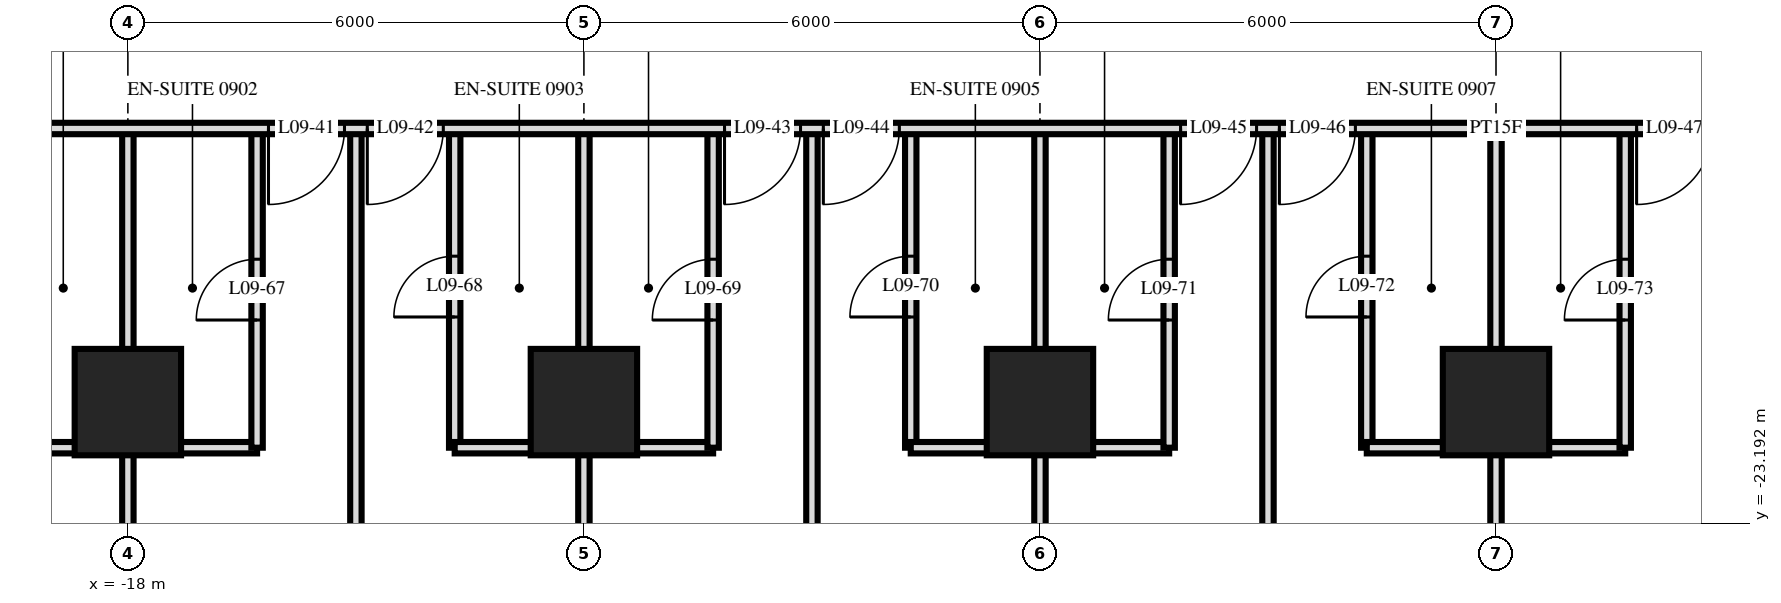
"""IFC4 building model, lengths in metres.
Left out: names, types, materials, properties, quantities, classifications, styles, units other than length and angle.
Written with IfcOpenShell. Run it as: python <this file> out.ifc"""

import sys

from ifc_helpers import new_model, si_unit, direction, frame, frame_2d, origin, origin_2d, place, context, subcontext, project, spatial, rectangle, extrude, element, fill, save


model = new_model("IFC4")
c1 = context("Model", 3, precision=1e-05, world=origin(), true_north=direction((0.0, 1.0)))
c2 = subcontext(c1, "Body", "Model", "MODEL_VIEW")
j1 = project(units=[si_unit("LENGTHUNIT", "METRE"), si_unit("PLANEANGLEUNIT", "RADIAN")], contexts=[c1])
p1 = place(None, origin())
s1 = spatial("IfcSite", under=j1, at=p1, CompositionType="ELEMENT")
p2 = place(p1, origin())
s2 = spatial("IfcBuilding", under=s1, at=p2, CompositionType="ELEMENT")
p3 = place(p2, frame((0.0, 0.0, 42.0)))
s3 = spatial("IfcBuildingStorey", under=s2, at=p3, CompositionType="ELEMENT", Elevation=42.0)
for number, where, z_axis, x_axis in (
    (1, (-18.0, -21.6, 0.0), (0.0, 0.0, 1.0), (1.0, 0.0, 0.0)),
    (2, (-12.0, -21.6, 0.0), (0.0, 0.0, 1.0), (1.0, 0.0, 0.0)),
    (3, (-6.0, -21.6, 0.0), (0.0, 0.0, 1.0), (1.0, 0.0, 0.0)),
    (4, (0.0, -21.6, 0.0), (0.0, 0.0, 1.0), (1.0, 0.0, 0.0)),
):
    element("IfcColumn", number, at=place(p3, frame(where, z_axis=z_axis, x_axis=x_axis)), inside=s3, PredefinedType="COLUMN", context=c2, shape_type="SweptSolid", body=[
        extrude(rectangle(XDim=1.4, YDim=1.4, at=origin_2d()), origin(), (0.0, 0.0, 1.0), 3.6),
    ])
p4 = place(p3, frame((1.7, -22.2, 0.0), z_axis=(0.0, 0.0, 1.0), x_axis=(0.0, 1.0, 0.0)))
e5 = element("IfcWall", 5, at=p4, inside=s3, PredefinedType="PARTITIONING", context=c2, shape_type="SweptSolid", body=[
    extrude(rectangle(XDim=4.2, YDim=0.15, at=frame_2d((2.1, 0.0))), origin(), (0.0, 0.0, 1.0), 3.32),
])
p5 = place(p4, frame((1.68, 0.0, 0.0)))
e6 = element("IfcOpeningElement", 6, at=p5, cuts=e5, PredefinedType="OPENING", context=c2, shape_type="SweptSolid", body=[
    extrude(rectangle(XDim=0.8, YDim=2.1, at=frame_2d((0.4, 1.05))), frame((0.0, 0.085, 0.0), z_axis=(0.0, -1.0, 0.0), x_axis=(1.0, 0.0, 0.0)), (0.0, 0.0, 1.0), 0.17),
])
p6 = place(p3, frame((0.0, -29.22, 0.0), z_axis=(0.0, 0.0, 1.0), x_axis=(0.0, 1.0, 0.0)))
e7 = element("IfcWall", 7, at=p6, inside=s3, PredefinedType="PARTITIONING", context=c2, shape_type="SweptSolid", body=[
    extrude(rectangle(XDim=11.22, YDim=0.15, at=frame_2d((5.61, 0.0))), origin(), (0.0, 0.0, 1.0), 3.32),
])
p7 = place(p3, frame((-1.7, -22.2, 0.0), z_axis=(0.0, 0.0, 1.0), x_axis=(0.0, 1.0, 0.0)))
e8 = element("IfcWall", 8, at=p7, inside=s3, PredefinedType="PARTITIONING", context=c2, shape_type="SweptSolid", body=[
    extrude(rectangle(XDim=4.2, YDim=0.15, at=frame_2d((2.1, 0.0))), origin(), (0.0, 0.0, 1.0), 3.32),
])
p8 = place(p7, frame((1.72, 0.0, 0.0)))
e9 = element("IfcOpeningElement", 9, at=p8, cuts=e8, PredefinedType="OPENING", context=c2, shape_type="SweptSolid", body=[
    extrude(rectangle(XDim=0.8, YDim=2.1, at=frame_2d((0.4, 1.05))), frame((0.0, 0.085, 0.0), z_axis=(0.0, -1.0, 0.0), x_axis=(1.0, 0.0, 0.0)), (0.0, 0.0, 1.0), 0.17),
])
p9 = place(p3, frame((-3.0, -29.22, 0.0), z_axis=(0.0, 0.0, 1.0), x_axis=(0.0, 1.0, 0.0)))
e10 = element("IfcWall", 10, at=p9, inside=s3, PredefinedType="PARTITIONING", context=c2, shape_type="SweptSolid", body=[
    extrude(rectangle(XDim=11.22, YDim=0.15, at=frame_2d((5.61, 0.0))), origin(), (0.0, 0.0, 1.0), 3.32),
])
p10 = place(p3, frame((-4.3, -22.2, 0.0), z_axis=(0.0, 0.0, 1.0), x_axis=(0.0, 1.0, 0.0)))
e11 = element("IfcWall", 11, at=p10, inside=s3, PredefinedType="PARTITIONING", context=c2, shape_type="SweptSolid", body=[
    extrude(rectangle(XDim=4.2, YDim=0.15, at=frame_2d((2.1, 0.0))), origin(), (0.0, 0.0, 1.0), 3.32),
])
p11 = place(p10, frame((1.68, 0.0, 0.0)))
e12 = element("IfcOpeningElement", 12, at=p11, cuts=e11, PredefinedType="OPENING", context=c2, shape_type="SweptSolid", body=[
    extrude(rectangle(XDim=0.8, YDim=2.1, at=frame_2d((0.4, 1.05))), frame((0.0, 0.085, 0.0), z_axis=(0.0, -1.0, 0.0), x_axis=(1.0, 0.0, 0.0)), (0.0, 0.0, 1.0), 0.17),
])
p12 = place(p3, frame((-6.0, -29.22, 0.0), z_axis=(0.0, 0.0, 1.0), x_axis=(0.0, 1.0, 0.0)))
e13 = element("IfcWall", 13, at=p12, inside=s3, PredefinedType="PARTITIONING", context=c2, shape_type="SweptSolid", body=[
    extrude(rectangle(XDim=11.22, YDim=0.15, at=frame_2d((5.61, 0.0))), origin(), (0.0, 0.0, 1.0), 3.32),
])
p13 = place(p3, frame((-7.7, -22.2, 0.0), z_axis=(0.0, 0.0, 1.0), x_axis=(0.0, 1.0, 0.0)))
e14 = element("IfcWall", 14, at=p13, inside=s3, PredefinedType="PARTITIONING", context=c2, shape_type="SweptSolid", body=[
    extrude(rectangle(XDim=4.2, YDim=0.15, at=frame_2d((2.1, 0.0))), origin(), (0.0, 0.0, 1.0), 3.32),
])
p14 = place(p13, frame((1.72, 0.0, 0.0)))
e15 = element("IfcOpeningElement", 15, at=p14, cuts=e14, PredefinedType="OPENING", context=c2, shape_type="SweptSolid", body=[
    extrude(rectangle(XDim=0.8, YDim=2.1, at=frame_2d((0.4, 1.05))), frame((0.0, 0.085, 0.0), z_axis=(0.0, -1.0, 0.0), x_axis=(1.0, 0.0, 0.0)), (0.0, 0.0, 1.0), 0.17),
])
p15 = place(p3, frame((-9.0, -29.22, 0.0), z_axis=(0.0, 0.0, 1.0), x_axis=(0.0, 1.0, 0.0)))
e16 = element("IfcWall", 16, at=p15, inside=s3, PredefinedType="PARTITIONING", context=c2, shape_type="SweptSolid", body=[
    extrude(rectangle(XDim=11.22, YDim=0.15, at=frame_2d((5.61, 0.0))), origin(), (0.0, 0.0, 1.0), 3.32),
])
p16 = place(p3, frame((-10.3, -22.2, 0.0), z_axis=(0.0, 0.0, 1.0), x_axis=(0.0, 1.0, 0.0)))
e17 = element("IfcWall", 17, at=p16, inside=s3, PredefinedType="PARTITIONING", context=c2, shape_type="SweptSolid", body=[
    extrude(rectangle(XDim=4.2, YDim=0.15, at=frame_2d((2.1, 0.0))), origin(), (0.0, 0.0, 1.0), 3.32),
])
p17 = place(p16, frame((1.68, 0.0, 0.0)))
e18 = element("IfcOpeningElement", 18, at=p17, cuts=e17, PredefinedType="OPENING", context=c2, shape_type="SweptSolid", body=[
    extrude(rectangle(XDim=0.8, YDim=2.1, at=frame_2d((0.4, 1.05))), frame((0.0, 0.085, 0.0), z_axis=(0.0, -1.0, 0.0), x_axis=(1.0, 0.0, 0.0)), (0.0, 0.0, 1.0), 0.17),
])
p18 = place(p3, frame((-12.0, -29.22, 0.0), z_axis=(0.0, 0.0, 1.0), x_axis=(0.0, 1.0, 0.0)))
e19 = element("IfcWall", 19, at=p18, inside=s3, PredefinedType="PARTITIONING", context=c2, shape_type="SweptSolid", body=[
    extrude(rectangle(XDim=11.22, YDim=0.15, at=frame_2d((5.61, 0.0))), origin(), (0.0, 0.0, 1.0), 3.32),
])
p19 = place(p3, frame((-13.7, -22.2, 0.0), z_axis=(0.0, 0.0, 1.0), x_axis=(0.0, 1.0, 0.0)))
e20 = element("IfcWall", 20, at=p19, inside=s3, PredefinedType="PARTITIONING", context=c2, shape_type="SweptSolid", body=[
    extrude(rectangle(XDim=4.2, YDim=0.15, at=frame_2d((2.1, 0.0))), origin(), (0.0, 0.0, 1.0), 3.32),
])
p20 = place(p19, frame((1.72, 0.0, 0.0)))
e21 = element("IfcOpeningElement", 21, at=p20, cuts=e20, PredefinedType="OPENING", context=c2, shape_type="SweptSolid", body=[
    extrude(rectangle(XDim=0.8, YDim=2.1, at=frame_2d((0.4, 1.05))), frame((0.0, 0.085, 0.0), z_axis=(0.0, -1.0, 0.0), x_axis=(1.0, 0.0, 0.0)), (0.0, 0.0, 1.0), 0.17),
])
p21 = place(p3, frame((-15.0, -29.22, 0.0), z_axis=(0.0, 0.0, 1.0), x_axis=(0.0, 1.0, 0.0)))
e22 = element("IfcWall", 22, at=p21, inside=s3, PredefinedType="PARTITIONING", context=c2, shape_type="SweptSolid", body=[
    extrude(rectangle(XDim=11.22, YDim=0.15, at=frame_2d((5.61, 0.0))), origin(), (0.0, 0.0, 1.0), 3.32),
])
p22 = place(p3, frame((-16.3, -22.2, 0.0), z_axis=(0.0, 0.0, 1.0), x_axis=(0.0, 1.0, 0.0)))
e23 = element("IfcWall", 23, at=p22, inside=s3, PredefinedType="PARTITIONING", context=c2, shape_type="SweptSolid", body=[
    extrude(rectangle(XDim=4.2, YDim=0.15, at=frame_2d((2.1, 0.0))), origin(), (0.0, 0.0, 1.0), 3.32),
])
p23 = place(p22, frame((1.68, 0.0, 0.0)))
e24 = element("IfcOpeningElement", 24, at=p23, cuts=e23, PredefinedType="OPENING", context=c2, shape_type="SweptSolid", body=[
    extrude(rectangle(XDim=0.8, YDim=2.1, at=frame_2d((0.4, 1.05))), frame((0.0, 0.085, 0.0), z_axis=(0.0, -1.0, 0.0), x_axis=(1.0, 0.0, 0.0)), (0.0, 0.0, 1.0), 0.17),
])
p24 = place(p3, frame((-18.0, -29.22, 0.0), z_axis=(0.0, 0.0, 1.0), x_axis=(0.0, 1.0, 0.0)))
e25 = element("IfcWall", 25, at=p24, inside=s3, PredefinedType="PARTITIONING", context=c2, shape_type="SweptSolid", body=[
    extrude(rectangle(XDim=11.22, YDim=0.15, at=frame_2d((5.61, 0.0))), origin(), (0.0, 0.0, 1.0), 3.32),
])
for number, where, z_axis, x_axis in (
    (26, (-19.7, -22.2, 0.0), (0.0, 0.0, 1.0), (1.0, 0.0, 0.0)),
    (27, (-13.7, -22.2, 0.0), (0.0, 0.0, 1.0), (1.0, 0.0, 0.0)),
    (28, (-7.7, -22.2, 0.0), (0.0, 0.0, 1.0), (1.0, 0.0, 0.0)),
    (29, (-1.7, -22.2, 0.0), (0.0, 0.0, 1.0), (1.0, 0.0, 0.0)),
):
    element("IfcWall", number, at=place(p3, frame(where, z_axis=z_axis, x_axis=x_axis)), inside=s3, PredefinedType="PARTITIONING", context=c2, shape_type="SweptSolid", body=[
        extrude(rectangle(XDim=3.4, YDim=0.15, at=frame_2d((1.7, 0.0))), origin(), (0.0, 0.0, 1.0), 3.32),
    ])
p25 = place(p3, frame((-33.12, -18.0, 0.0), z_axis=(0.0, 0.0, 1.0), x_axis=(1.0, 0.0, 0.0)))
e30 = element("IfcWall", 30, at=p25, inside=s3, PredefinedType="PARTITIONING", context=c2, shape_type="SweptSolid", body=[
    extrude(rectangle(XDim=66.24, YDim=0.15, at=frame_2d((33.12, 0.0))), origin(), (0.0, 0.0, 1.0), 3.32),
])
p26 = place(p25, frame((12.27, 0.0, 0.0)))
e31 = element("IfcOpeningElement", 31, at=p26, cuts=e30, PredefinedType="OPENING", context=c2, shape_type="SweptSolid", body=[
    extrude(rectangle(XDim=1.0, YDim=2.1, at=frame_2d((0.5, 1.05))), frame((0.0, 0.085, 0.0), z_axis=(0.0, -1.0, 0.0), x_axis=(1.0, 0.0, 0.0)), (0.0, 0.0, 1.0), 0.17),
])
p27 = place(p25, frame((16.97, 0.0, 0.0)))
e32 = element("IfcOpeningElement", 32, at=p27, cuts=e30, PredefinedType="OPENING", context=c2, shape_type="SweptSolid", body=[
    extrude(rectangle(XDim=1.0, YDim=2.1, at=frame_2d((0.5, 1.05))), frame((0.0, 0.085, 0.0), z_axis=(0.0, -1.0, 0.0), x_axis=(1.0, 0.0, 0.0)), (0.0, 0.0, 1.0), 0.17),
])
p28 = place(p25, frame((18.27, 0.0, 0.0)))
e33 = element("IfcOpeningElement", 33, at=p28, cuts=e30, PredefinedType="OPENING", context=c2, shape_type="SweptSolid", body=[
    extrude(rectangle(XDim=1.0, YDim=2.1, at=frame_2d((0.5, 1.05))), frame((0.0, 0.085, 0.0), z_axis=(0.0, -1.0, 0.0), x_axis=(1.0, 0.0, 0.0)), (0.0, 0.0, 1.0), 0.17),
])
p29 = place(p25, frame((22.97, 0.0, 0.0)))
e34 = element("IfcOpeningElement", 34, at=p29, cuts=e30, PredefinedType="OPENING", context=c2, shape_type="SweptSolid", body=[
    extrude(rectangle(XDim=1.0, YDim=2.1, at=frame_2d((0.5, 1.05))), frame((0.0, 0.085, 0.0), z_axis=(0.0, -1.0, 0.0), x_axis=(1.0, 0.0, 0.0)), (0.0, 0.0, 1.0), 0.17),
])
p30 = place(p25, frame((24.27, 0.0, 0.0)))
e35 = element("IfcOpeningElement", 35, at=p30, cuts=e30, PredefinedType="OPENING", context=c2, shape_type="SweptSolid", body=[
    extrude(rectangle(XDim=1.0, YDim=2.1, at=frame_2d((0.5, 1.05))), frame((0.0, 0.085, 0.0), z_axis=(0.0, -1.0, 0.0), x_axis=(1.0, 0.0, 0.0)), (0.0, 0.0, 1.0), 0.17),
])
p31 = place(p25, frame((28.97, 0.0, 0.0)))
e36 = element("IfcOpeningElement", 36, at=p31, cuts=e30, PredefinedType="OPENING", context=c2, shape_type="SweptSolid", body=[
    extrude(rectangle(XDim=1.0, YDim=2.1, at=frame_2d((0.5, 1.05))), frame((0.0, 0.085, 0.0), z_axis=(0.0, -1.0, 0.0), x_axis=(1.0, 0.0, 0.0)), (0.0, 0.0, 1.0), 0.17),
])
p32 = place(p25, frame((30.27, 0.0, 0.0)))
e37 = element("IfcOpeningElement", 37, at=p32, cuts=e30, PredefinedType="OPENING", context=c2, shape_type="SweptSolid", body=[
    extrude(rectangle(XDim=1.0, YDim=2.1, at=frame_2d((0.5, 1.05))), frame((0.0, 0.085, 0.0), z_axis=(0.0, -1.0, 0.0), x_axis=(1.0, 0.0, 0.0)), (0.0, 0.0, 1.0), 0.17),
])
p33 = place(p25, frame((34.97, 0.0, 0.0)))
e38 = element("IfcOpeningElement", 38, at=p33, cuts=e30, PredefinedType="OPENING", context=c2, shape_type="SweptSolid", body=[
    extrude(rectangle(XDim=1.0, YDim=2.1, at=frame_2d((0.5, 1.05))), frame((0.0, 0.085, 0.0), z_axis=(0.0, -1.0, 0.0), x_axis=(1.0, 0.0, 0.0)), (0.0, 0.0, 1.0), 0.17),
])
p34 = place(p25, frame((37.27, 0.0, 0.0)))
e39 = element("IfcOpeningElement", 39, at=p34, cuts=e30, PredefinedType="OPENING", context=c2, shape_type="SweptSolid", body=[
    extrude(rectangle(XDim=1.0, YDim=2.1, at=frame_2d((0.5, 1.05))), frame((0.0, 0.085, 0.0), z_axis=(0.0, -1.0, 0.0), x_axis=(1.0, 0.0, 0.0)), (0.0, 0.0, 1.0), 0.17),
])
p35 = place(p25, frame((43.97, 0.0, 0.0)))
e40 = element("IfcOpeningElement", 40, at=p35, cuts=e30, PredefinedType="OPENING", context=c2, shape_type="SweptSolid", body=[
    extrude(rectangle(XDim=1.0, YDim=2.1, at=frame_2d((0.5, 1.05))), frame((0.0, 0.085, 0.0), z_axis=(0.0, -1.0, 0.0), x_axis=(1.0, 0.0, 0.0)), (0.0, 0.0, 1.0), 0.17),
])
p36 = place(p25, frame((45.27, 0.0, 0.0)))
e41 = element("IfcOpeningElement", 41, at=p36, cuts=e30, PredefinedType="OPENING", context=c2, shape_type="SweptSolid", body=[
    extrude(rectangle(XDim=1.0, YDim=2.1, at=frame_2d((0.5, 1.05))), frame((0.0, 0.085, 0.0), z_axis=(0.0, -1.0, 0.0), x_axis=(1.0, 0.0, 0.0)), (0.0, 0.0, 1.0), 0.17),
])
p37 = place(p25, frame((51.22, 0.0, 0.0)))
e42 = element("IfcOpeningElement", 42, at=p37, cuts=e30, PredefinedType="OPENING", context=c2, shape_type="SweptSolid", body=[
    extrude(rectangle(XDim=1.0, YDim=2.1, at=frame_2d((0.5, 1.05))), frame((0.0, 0.085, 0.0), z_axis=(0.0, -1.0, 0.0), x_axis=(1.0, 0.0, 0.0)), (0.0, 0.0, 1.0), 0.17),
])
p38 = place(p25, frame((54.27, 0.0, 0.0)))
e43 = element("IfcOpeningElement", 43, at=p38, cuts=e30, PredefinedType="OPENING", context=c2, shape_type="SweptSolid", body=[
    extrude(rectangle(XDim=1.0, YDim=2.1, at=frame_2d((0.5, 1.05))), frame((0.0, 0.085, 0.0), z_axis=(0.0, -1.0, 0.0), x_axis=(1.0, 0.0, 0.0)), (0.0, 0.0, 1.0), 0.17),
])
p39 = place(p25, frame((6.07, 0.0, 0.0)))
e44 = element("IfcOpeningElement", 44, at=p39, cuts=e30, PredefinedType="OPENING", context=c2, shape_type="SweptSolid", body=[
    extrude(rectangle(XDim=1.0, YDim=2.1, at=frame_2d((0.5, 1.05))), frame((0.0, 0.085, 0.0), z_axis=(0.0, -1.0, 0.0), x_axis=(1.0, 0.0, 0.0)), (0.0, 0.0, 1.0), 0.17),
])
p40 = place(p25, frame((63.37, 0.0, 0.0)))
e45 = element("IfcOpeningElement", 45, at=p40, cuts=e30, PredefinedType="OPENING", context=c2, shape_type="SweptSolid", body=[
    extrude(rectangle(XDim=1.0, YDim=2.1, at=frame_2d((0.5, 1.05))), frame((0.0, 0.085, 0.0), z_axis=(0.0, -1.0, 0.0), x_axis=(1.0, 0.0, 0.0)), (0.0, 0.0, 1.0), 0.17),
])
p41 = place(p27, frame((0.5, 0.0, 0.0), z_axis=(0.0, 0.0, 1.0), x_axis=(-1.0, 0.0, 0.0)))
e46 = element("IfcDoor", 46, at=p41, inside=s3, OperationType="SINGLE_SWING_LEFT", PredefinedType="DOOR", context=c2, shape_type="SweptSolid", body=[
    extrude(rectangle(XDim=1.0, YDim=2.1, at=frame_2d((0.0, 1.05))), frame((0.0, -0.025, 0.0), z_axis=(0.0, 1.0, 0.0), x_axis=(-1.0, 0.0, 0.0)), (0.0, 0.0, 1.0), 0.05),
])
fill(e32, e46)
p42 = place(p28, frame((0.5, 0.0, 0.0), z_axis=(0.0, 0.0, 1.0), x_axis=(-1.0, 0.0, 0.0)))
e47 = element("IfcDoor", 47, at=p42, inside=s3, OperationType="SINGLE_SWING_LEFT", PredefinedType="DOOR", context=c2, shape_type="SweptSolid", body=[
    extrude(rectangle(XDim=1.0, YDim=2.1, at=frame_2d((0.0, 1.05))), frame((0.0, -0.025, 0.0), z_axis=(0.0, 1.0, 0.0), x_axis=(-1.0, 0.0, 0.0)), (0.0, 0.0, 1.0), 0.05),
])
fill(e33, e47)
p43 = place(p29, frame((0.5, 0.0, 0.0), z_axis=(0.0, 0.0, 1.0), x_axis=(-1.0, 0.0, 0.0)))
e48 = element("IfcDoor", 48, at=p43, inside=s3, OperationType="SINGLE_SWING_LEFT", PredefinedType="DOOR", context=c2, shape_type="SweptSolid", body=[
    extrude(rectangle(XDim=1.0, YDim=2.1, at=frame_2d((0.0, 1.05))), frame((0.0, -0.025, 0.0), z_axis=(0.0, 1.0, 0.0), x_axis=(-1.0, 0.0, 0.0)), (0.0, 0.0, 1.0), 0.05),
])
fill(e34, e48)
p44 = place(p30, frame((0.5, 0.0, 0.0), z_axis=(0.0, 0.0, 1.0), x_axis=(-1.0, 0.0, 0.0)))
e49 = element("IfcDoor", 49, at=p44, inside=s3, OperationType="SINGLE_SWING_LEFT", PredefinedType="DOOR", context=c2, shape_type="SweptSolid", body=[
    extrude(rectangle(XDim=1.0, YDim=2.1, at=frame_2d((0.0, 1.05))), frame((0.0, -0.025, 0.0), z_axis=(0.0, 1.0, 0.0), x_axis=(-1.0, 0.0, 0.0)), (0.0, 0.0, 1.0), 0.05),
])
fill(e35, e49)
p45 = place(p31, frame((0.5, 0.0, 0.0), z_axis=(0.0, 0.0, 1.0), x_axis=(-1.0, 0.0, 0.0)))
e50 = element("IfcDoor", 50, at=p45, inside=s3, OperationType="SINGLE_SWING_LEFT", PredefinedType="DOOR", context=c2, shape_type="SweptSolid", body=[
    extrude(rectangle(XDim=1.0, YDim=2.1, at=frame_2d((0.0, 1.05))), frame((0.0, -0.025, 0.0), z_axis=(0.0, 1.0, 0.0), x_axis=(-1.0, 0.0, 0.0)), (0.0, 0.0, 1.0), 0.05),
])
fill(e36, e50)
p46 = place(p32, frame((0.5, 0.0, 0.0), z_axis=(0.0, 0.0, 1.0), x_axis=(-1.0, 0.0, 0.0)))
e51 = element("IfcDoor", 51, at=p46, inside=s3, OperationType="SINGLE_SWING_LEFT", PredefinedType="DOOR", context=c2, shape_type="SweptSolid", body=[
    extrude(rectangle(XDim=1.0, YDim=2.1, at=frame_2d((0.0, 1.05))), frame((0.0, -0.025, 0.0), z_axis=(0.0, 1.0, 0.0), x_axis=(-1.0, 0.0, 0.0)), (0.0, 0.0, 1.0), 0.05),
])
fill(e37, e51)
p47 = place(p33, frame((0.5, 0.0, 0.0), z_axis=(0.0, 0.0, 1.0), x_axis=(-1.0, 0.0, 0.0)))
e52 = element("IfcDoor", 52, at=p47, inside=s3, OperationType="SINGLE_SWING_LEFT", PredefinedType="DOOR", context=c2, shape_type="SweptSolid", body=[
    extrude(rectangle(XDim=1.0, YDim=2.1, at=frame_2d((0.0, 1.05))), frame((0.0, -0.025, 0.0), z_axis=(0.0, 1.0, 0.0), x_axis=(-1.0, 0.0, 0.0)), (0.0, 0.0, 1.0), 0.05),
])
fill(e38, e52)
p48 = place(p23, origin())
e53 = element("IfcDoor", 53, at=p48, inside=s3, OperationType="SINGLE_SWING_RIGHT", PredefinedType="DOOR", context=c2, shape_type="SweptSolid", body=[
    extrude(rectangle(XDim=0.8, YDim=2.1, at=frame_2d((0.4, 1.05))), frame((0.0, 0.025, 0.0), z_axis=(0.0, -1.0, 0.0), x_axis=(1.0, 0.0, 0.0)), (0.0, 0.0, 1.0), 0.05),
])
fill(e24, e53)
p49 = place(p20, origin())
e54 = element("IfcDoor", 54, at=p49, inside=s3, OperationType="SINGLE_SWING_RIGHT", PredefinedType="DOOR", context=c2, shape_type="SweptSolid", body=[
    extrude(rectangle(XDim=0.8, YDim=2.1, at=frame_2d((0.4, 1.05))), frame((0.0, 0.025, 0.0), z_axis=(0.0, -1.0, 0.0), x_axis=(1.0, 0.0, 0.0)), (0.0, 0.0, 1.0), 0.05),
])
fill(e21, e54)
p50 = place(p17, origin())
e55 = element("IfcDoor", 55, at=p50, inside=s3, OperationType="SINGLE_SWING_RIGHT", PredefinedType="DOOR", context=c2, shape_type="SweptSolid", body=[
    extrude(rectangle(XDim=0.8, YDim=2.1, at=frame_2d((0.4, 1.05))), frame((0.0, 0.025, 0.0), z_axis=(0.0, -1.0, 0.0), x_axis=(1.0, 0.0, 0.0)), (0.0, 0.0, 1.0), 0.05),
])
fill(e18, e55)
p51 = place(p14, origin())
e56 = element("IfcDoor", 56, at=p51, inside=s3, OperationType="SINGLE_SWING_RIGHT", PredefinedType="DOOR", context=c2, shape_type="SweptSolid", body=[
    extrude(rectangle(XDim=0.8, YDim=2.1, at=frame_2d((0.4, 1.05))), frame((0.0, 0.025, 0.0), z_axis=(0.0, -1.0, 0.0), x_axis=(1.0, 0.0, 0.0)), (0.0, 0.0, 1.0), 0.05),
])
fill(e15, e56)
p52 = place(p11, origin())
e57 = element("IfcDoor", 57, at=p52, inside=s3, OperationType="SINGLE_SWING_RIGHT", PredefinedType="DOOR", context=c2, shape_type="SweptSolid", body=[
    extrude(rectangle(XDim=0.8, YDim=2.1, at=frame_2d((0.4, 1.05))), frame((0.0, 0.025, 0.0), z_axis=(0.0, -1.0, 0.0), x_axis=(1.0, 0.0, 0.0)), (0.0, 0.0, 1.0), 0.05),
])
fill(e12, e57)
p53 = place(p8, origin())
e58 = element("IfcDoor", 58, at=p53, inside=s3, OperationType="SINGLE_SWING_RIGHT", PredefinedType="DOOR", context=c2, shape_type="SweptSolid", body=[
    extrude(rectangle(XDim=0.8, YDim=2.1, at=frame_2d((0.4, 1.05))), frame((0.0, 0.025, 0.0), z_axis=(0.0, -1.0, 0.0), x_axis=(1.0, 0.0, 0.0)), (0.0, 0.0, 1.0), 0.05),
])
fill(e9, e58)
p54 = place(p5, origin())
e59 = element("IfcDoor", 59, at=p54, inside=s3, OperationType="SINGLE_SWING_RIGHT", PredefinedType="DOOR", context=c2, shape_type="SweptSolid", body=[
    extrude(rectangle(XDim=0.8, YDim=2.1, at=frame_2d((0.4, 1.05))), frame((0.0, 0.025, 0.0), z_axis=(0.0, -1.0, 0.0), x_axis=(1.0, 0.0, 0.0)), (0.0, 0.0, 1.0), 0.05),
])
fill(e6, e59)
save(model, sys.argv[1])
